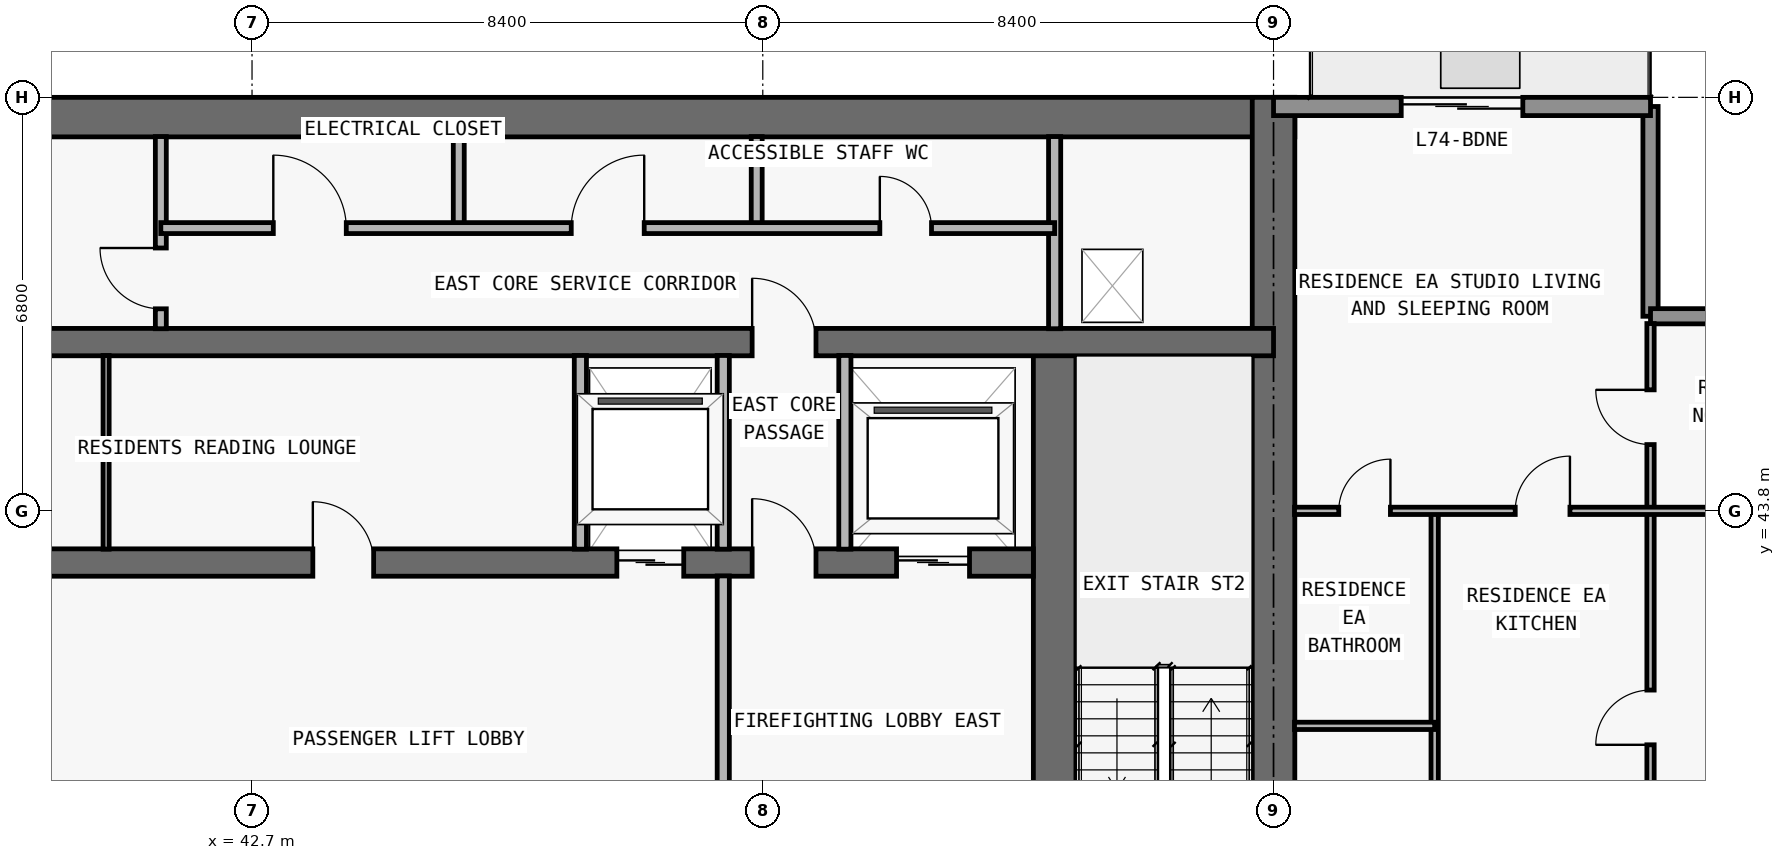
"""IFC4 building model, lengths in metres.
Left out: names, types, materials, properties, quantities, classifications, styles, units other than length and angle.
Written with IfcOpenShell. Run it as: python <this file> out.ifc"""

import sys

from ifc_helpers import new_model, si_unit, direction, frame, frame_2d, origin, place, context, subcontext, project, spatial, rectangle, extrude, element, fill, save


model = new_model("IFC4")
c1 = context("Model", 3, precision=1e-05, world=origin(), true_north=direction((0.0, 1.0)))
c2 = subcontext(c1, "Body", "Model", "MODEL_VIEW")
j1 = project(units=[si_unit("LENGTHUNIT", "METRE"), si_unit("PLANEANGLEUNIT", "RADIAN")], contexts=[c1])
p1 = place(None, origin())
s1 = spatial("IfcSite", under=j1, at=p1, CompositionType="ELEMENT")
p2 = place(p1, origin())
s2 = spatial("IfcBuilding", under=s1, at=p2, CompositionType="ELEMENT")
p3 = place(p2, frame((0.0, 0.0, 262.8)))
s3 = spatial("IfcBuildingStorey", under=s2, at=p3, CompositionType="ELEMENT", Elevation=262.8)
p4 = place(p3, frame((17.95, 50.275, 0.0), z_axis=(0.0, 0.0, 1.0), x_axis=(1.0, 0.0, 0.0)))
e1 = element("IfcWall", 1, at=p4, inside=s3, PredefinedType="SHEAR", context=c2, shape_type="SweptSolid", body=[
    extrude(rectangle(XDim=41.9, YDim=0.65, at=frame_2d((20.95, 0.0))), origin(), (0.0, 0.0, 1.0), 3.05),
])
p5 = place(p3, frame((59.5, 36.65, 0.0), z_axis=(0.0, 0.0, 1.0), x_axis=(0.0, 1.0, 0.0)))
e2 = element("IfcWall", 2, at=p5, inside=s3, PredefinedType="SHEAR", context=c2, shape_type="SweptSolid", body=[
    extrude(rectangle(XDim=13.95, YDim=0.7, at=frame_2d((6.975, 0.0))), origin(), (0.0, 0.0, 1.0), 3.05),
])
p6 = place(p3, frame((55.9, 37.0, 0.0), z_axis=(0.0, 0.0, 1.0), x_axis=(0.0, 1.0, 0.0)))
e3 = element("IfcWall", 3, at=p6, inside=s3, PredefinedType="SHEAR", context=c2, shape_type="SweptSolid", body=[
    extrude(rectangle(XDim=9.575, YDim=0.7, at=frame_2d((4.788, 0.0))), origin(), (0.0, 0.0, 1.0), 3.05),
])
p7 = place(p6, frame((0.55, 0.0, 0.0)))
e4 = element("IfcOpeningElement", 4, at=p7, cuts=e3, PredefinedType="OPENING", context=c2, shape_type="SweptSolid", body=[
    extrude(rectangle(XDim=1.1, YDim=2.15, at=frame_2d((0.55, 1.075))), frame((0.0, 0.36, 0.0), z_axis=(0.0, -1.0, 0.0), x_axis=(1.0, 0.0, 0.0)), (0.0, 0.0, 1.0), 0.72),
])
p8 = place(p3, frame((22.25, 42.95, 0.0), z_axis=(0.0, 0.0, 1.0), x_axis=(1.0, 0.0, 0.0)))
e5 = element("IfcWall", 5, at=p8, inside=s3, PredefinedType="SHEAR", context=c2, shape_type="SweptSolid", body=[
    extrude(rectangle(XDim=33.3, YDim=0.45, at=frame_2d((16.65, 0.0))), origin(), (0.0, 0.0, 1.0), 3.05),
])
p9 = place(p8, frame((1.05, 0.0, 0.0)))
e6 = element("IfcOpeningElement", 6, at=p9, cuts=e5, PredefinedType="OPENING", context=c2, shape_type="SweptSolid", body=[
    extrude(rectangle(XDim=1.2, YDim=2.2, at=frame_2d((0.6, 1.1))), frame((0.0, 0.235, 0.0), z_axis=(0.0, -1.0, 0.0), x_axis=(1.0, 0.0, 0.0)), (0.0, 0.0, 1.0), 0.47),
])
p10 = place(p8, frame((31.05, 0.0, 0.0)))
e7 = element("IfcOpeningElement", 7, at=p10, cuts=e5, PredefinedType="OPENING", context=c2, shape_type="SweptSolid", body=[
    extrude(rectangle(XDim=1.2, YDim=2.2, at=frame_2d((0.6, 1.1))), frame((0.0, 0.235, 0.0), z_axis=(0.0, -1.0, 0.0), x_axis=(1.0, 0.0, 0.0)), (0.0, 0.0, 1.0), 0.47),
])
p11 = place(p8, frame((26.45, 0.0, 0.0)))
e8 = element("IfcOpeningElement", 8, at=p11, cuts=e5, PredefinedType="OPENING", context=c2, shape_type="SweptSolid", body=[
    extrude(rectangle(XDim=1.1, YDim=2.2, at=frame_2d((0.55, 1.1))), frame((0.0, 0.235, 0.0), z_axis=(0.0, -1.0, 0.0), x_axis=(1.0, 0.0, 0.0)), (0.0, 0.0, 1.0), 0.47),
])
p12 = place(p8, frame((5.95, 0.0, 0.0)))
e9 = element("IfcOpeningElement", 9, at=p12, cuts=e5, PredefinedType="OPENING", context=c2, shape_type="SweptSolid", body=[
    extrude(rectangle(XDim=1.1, YDim=2.2, at=frame_2d((0.55, 1.1))), frame((0.0, 0.235, 0.0), z_axis=(0.0, -1.0, 0.0), x_axis=(1.0, 0.0, 0.0)), (0.0, 0.0, 1.0), 0.47),
])
p13 = place(p8, frame((3.625, 0.0, 0.0)))
e10 = element("IfcOpeningElement", 10, at=p13, cuts=e5, PredefinedType="OPENING", context=c2, shape_type="SweptSolid", body=[
    extrude(rectangle(XDim=1.05, YDim=2.15, at=frame_2d((0.525, 1.075))), frame((0.0, 0.235, 0.0), z_axis=(0.0, -1.0, 0.0), x_axis=(1.0, 0.0, 0.0)), (0.0, 0.0, 1.0), 0.47),
])
p14 = place(p8, frame((28.675, 0.0, 0.0)))
e11 = element("IfcOpeningElement", 11, at=p14, cuts=e5, PredefinedType="OPENING", context=c2, shape_type="SweptSolid", body=[
    extrude(rectangle(XDim=1.05, YDim=2.15, at=frame_2d((0.525, 1.075))), frame((0.0, 0.235, 0.0), z_axis=(0.0, -1.0, 0.0), x_axis=(1.0, 0.0, 0.0)), (0.0, 0.0, 1.0), 0.47),
])
p15 = place(p8, frame((14.7, 0.0, 0.0)))
e12 = element("IfcOpeningElement", 12, at=p15, cuts=e5, PredefinedType="OPENING", context=c2, shape_type="SweptSolid", body=[
    extrude(rectangle(XDim=1.0, YDim=2.2, at=frame_2d((0.5, 1.1))), frame((0.0, 0.235, 0.0), z_axis=(0.0, -1.0, 0.0), x_axis=(1.0, 0.0, 0.0)), (0.0, 0.0, 1.0), 0.47),
])
p16 = place(p8, frame((21.45, 0.0, 0.0)))
e13 = element("IfcOpeningElement", 13, at=p16, cuts=e5, PredefinedType="OPENING", context=c2, shape_type="SweptSolid", body=[
    extrude(rectangle(XDim=1.0, YDim=2.2, at=frame_2d((0.5, 1.1))), frame((0.0, 0.235, 0.0), z_axis=(0.0, -1.0, 0.0), x_axis=(1.0, 0.0, 0.0)), (0.0, 0.0, 1.0), 0.47),
])
p17 = place(p3, frame((18.3, 46.575, 0.0), z_axis=(0.0, 0.0, 1.0), x_axis=(1.0, 0.0, 0.0)))
e14 = element("IfcWall", 14, at=p17, inside=s3, PredefinedType="SHEAR", context=c2, shape_type="SweptSolid", body=[
    extrude(rectangle(XDim=41.2, YDim=0.45, at=frame_2d((20.6, 0.0))), origin(), (0.0, 0.0, 1.0), 3.05),
])
p18 = place(p17, frame((7.6, 0.0, 0.0)))
e15 = element("IfcOpeningElement", 15, at=p18, cuts=e14, PredefinedType="OPENING", context=c2, shape_type="SweptSolid", body=[
    extrude(rectangle(XDim=1.0, YDim=2.2, at=frame_2d((0.5, 1.1))), frame((0.0, 0.235, 0.0), z_axis=(0.0, -1.0, 0.0), x_axis=(1.0, 0.0, 0.0)), (0.0, 0.0, 1.0), 0.47),
])
p19 = place(p17, frame((32.625, 0.0, 0.0)))
e16 = element("IfcOpeningElement", 16, at=p19, cuts=e14, PredefinedType="OPENING", context=c2, shape_type="SweptSolid", body=[
    extrude(rectangle(XDim=1.05, YDim=2.15, at=frame_2d((0.525, 1.075))), frame((0.0, 0.235, 0.0), z_axis=(0.0, -1.0, 0.0), x_axis=(1.0, 0.0, 0.0)), (0.0, 0.0, 1.0), 0.47),
])
p20 = place(p3, frame((65.7, 50.45, 0.0), z_axis=(0.0, 0.0, 1.0), x_axis=(0.0, -1.0, 0.0)))
e17 = element("IfcWall", 17, at=p20, inside=s3, PredefinedType="ELEMENTEDWALL", context=c2, shape_type="SweptSolid", body=[
    extrude(rectangle(XDim=3.45, YDim=0.25, at=frame_2d((1.725, 0.0))), origin(), (0.0, 0.0, 1.0), 3.05),
])
p21 = place(p3, frame((65.7, 47.0, 0.0), z_axis=(0.0, 0.0, 1.0), x_axis=(1.0, 0.0, 0.0)))
e18 = element("IfcWall", 18, at=p21, inside=s3, PredefinedType="ELEMENTEDWALL", context=c2, shape_type="SweptSolid", body=[
    extrude(rectangle(XDim=3.85, YDim=0.25, at=frame_2d((1.925, 0.0))), origin(), (0.0, 0.0, 1.0), 3.05),
])
p22 = place(p3, frame((59.5, 50.45, 0.0), z_axis=(0.0, 0.0, 1.0), x_axis=(1.0, 0.0, 0.0)))
e19 = element("IfcWall", 19, at=p22, inside=s3, PredefinedType="STANDARD", context=c2, shape_type="SweptSolid", body=[
    extrude(rectangle(XDim=6.2, YDim=0.3, at=frame_2d((3.1, 0.0))), origin(), (0.0, 0.0, 1.0), 3.05),
])
p23 = place(p22, frame((2.1, 0.0, 0.0)))
e20 = element("IfcOpeningElement", 20, at=p23, cuts=e19, PredefinedType="OPENING", context=c2, shape_type="SweptSolid", body=[
    extrude(rectangle(XDim=2.0, YDim=2.3, at=frame_2d((1.0, 1.15))), frame((0.0, 0.16, 0.0), z_axis=(0.0, -1.0, 0.0), x_axis=(1.0, 0.0, 0.0)), (0.0, 0.0, 1.0), 0.32),
])
p24 = place(p3, frame((40.3, 43.17, 0.0), z_axis=(0.0, 0.0, 1.0), x_axis=(0.0, 1.0, 0.0)))
e21 = element("IfcWall", 21, at=p24, inside=s3, PredefinedType="MOVABLE", context=c2, shape_type="SweptSolid", body=[
    extrude(rectangle(XDim=3.185, YDim=0.1, at=frame_2d((1.593, 0.0))), origin(), (0.0, 0.0, 1.0), 3.05),
])
p25 = place(p3, frame((41.2, 46.795, 0.0), z_axis=(0.0, 0.0, 1.0), x_axis=(0.0, 1.0, 0.0)))
e22 = element("IfcWall", 22, at=p25, inside=s3, PredefinedType="PARTITIONING", context=c2, shape_type="SweptSolid", body=[
    extrude(rectangle(XDim=3.16, YDim=0.18, at=frame_2d((1.58, 0.0))), origin(), (0.0, 0.0, 1.0), 3.05),
])
p26 = place(p25, frame((0.327, 0.0, 0.0)))
e23 = element("IfcOpeningElement", 23, at=p26, cuts=e22, PredefinedType="OPENING", context=c2, shape_type="SweptSolid", body=[
    extrude(rectangle(XDim=1.0, YDim=2.2, at=frame_2d((0.5, 1.1))), frame((0.0, 0.1, 0.0), z_axis=(0.0, -1.0, 0.0), x_axis=(1.0, 0.0, 0.0)), (0.0, 0.0, 1.0), 0.2),
])
p27 = place(p3, frame((46.1, 48.45, 0.0), z_axis=(0.0, 0.0, 1.0), x_axis=(0.0, 1.0, 0.0)))
e24 = element("IfcWall", 24, at=p27, inside=s3, PredefinedType="PARTITIONING", context=c2, shape_type="SweptSolid", body=[
    extrude(rectangle(XDim=1.505, YDim=0.18, at=frame_2d((0.752, 0.0))), origin(), (0.0, 0.0, 1.0), 3.05),
])
p28 = place(p3, frame((48.1, 43.17, 0.0), z_axis=(0.0, 0.0, 1.0), x_axis=(0.0, 1.0, 0.0)))
e25 = element("IfcWall", 25, at=p28, inside=s3, PredefinedType="PARTITIONING", context=c2, shape_type="SweptSolid", body=[
    extrude(rectangle(XDim=3.185, YDim=0.2, at=frame_2d((1.593, 0.0))), origin(), (0.0, 0.0, 1.0), 3.05),
])
p29 = place(p3, frame((50.45, 37.345, 0.0), z_axis=(0.0, 0.0, 1.0), x_axis=(0.0, 1.0, 0.0)))
e26 = element("IfcWall", 26, at=p29, inside=s3, PredefinedType="PARTITIONING", context=c2, shape_type="SweptSolid", body=[
    extrude(rectangle(XDim=5.385, YDim=0.2, at=frame_2d((2.692, 0.0))), origin(), (0.0, 0.0, 1.0), 3.05),
])
p30 = place(p3, frame((50.45, 43.17, 0.0), z_axis=(0.0, 0.0, 1.0), x_axis=(0.0, 1.0, 0.0)))
e27 = element("IfcWall", 27, at=p30, inside=s3, PredefinedType="PARTITIONING", context=c2, shape_type="SweptSolid", body=[
    extrude(rectangle(XDim=3.185, YDim=0.2, at=frame_2d((1.593, 0.0))), origin(), (0.0, 0.0, 1.0), 3.05),
])
p31 = place(p3, frame((51.0, 48.45, 0.0), z_axis=(0.0, 0.0, 1.0), x_axis=(0.0, 1.0, 0.0)))
e28 = element("IfcWall", 28, at=p31, inside=s3, PredefinedType="PARTITIONING", context=c2, shape_type="SweptSolid", body=[
    extrude(rectangle(XDim=1.505, YDim=0.18, at=frame_2d((0.752, 0.0))), origin(), (0.0, 0.0, 1.0), 3.05),
])
p32 = place(p3, frame((52.45, 43.17, 0.0), z_axis=(0.0, 0.0, 1.0), x_axis=(0.0, 1.0, 0.0)))
e29 = element("IfcWall", 29, at=p32, inside=s3, PredefinedType="PARTITIONING", context=c2, shape_type="SweptSolid", body=[
    extrude(rectangle(XDim=3.185, YDim=0.2, at=frame_2d((1.593, 0.0))), origin(), (0.0, 0.0, 1.0), 3.05),
])
p33 = place(p3, frame((55.9, 46.795, 0.0), z_axis=(0.0, 0.0, 1.0), x_axis=(0.0, 1.0, 0.0)))
e30 = element("IfcWall", 30, at=p33, inside=s3, PredefinedType="PARTITIONING", context=c2, shape_type="SweptSolid", body=[
    extrude(rectangle(XDim=3.16, YDim=0.2, at=frame_2d((1.58, 0.0))), origin(), (0.0, 0.0, 1.0), 3.05),
])
p34 = place(p3, frame((62.15, 37.0, 0.0), z_axis=(0.0, 0.0, 1.0), x_axis=(0.0, 1.0, 0.0)))
e31 = element("IfcWall", 31, at=p34, inside=s3, PredefinedType="PARTITIONING", context=c2, shape_type="SweptSolid", body=[
    extrude(rectangle(XDim=6.8, YDim=0.12, at=frame_2d((3.4, 0.0))), origin(), (0.0, 0.0, 1.0), 3.05),
])
p35 = place(p34, frame((1.207, 0.0, 0.0)))
e32 = element("IfcOpeningElement", 32, at=p35, cuts=e31, PredefinedType="OPENING", context=c2, shape_type="SweptSolid", body=[
    extrude(rectangle(XDim=0.85, YDim=2.1, at=frame_2d((0.425, 1.05))), frame((0.0, 0.07, 0.0), z_axis=(0.0, -1.0, 0.0), x_axis=(1.0, 0.0, 0.0)), (0.0, 0.0, 1.0), 0.14),
])
p36 = place(p3, frame((65.7, 37.005, 0.0), z_axis=(0.0, 0.0, 1.0), x_axis=(0.0, 1.0, 0.0)))
e33 = element("IfcWall", 33, at=p36, inside=s3, PredefinedType="PARTITIONING", context=c2, shape_type="SweptSolid", body=[
    extrude(rectangle(XDim=9.875, YDim=0.12, at=frame_2d((4.938, 0.0))), origin(), (0.0, 0.0, 1.0), 2.629),
])
p37 = place(p36, frame((2.948, 0.0, 0.0)))
e34 = element("IfcOpeningElement", 34, at=p37, cuts=e33, PredefinedType="OPENING", context=c2, shape_type="SweptSolid", body=[
    extrude(rectangle(XDim=0.9, YDim=2.15, at=frame_2d((0.45, 1.075))), frame((0.0, 0.07, 0.0), z_axis=(0.0, -1.0, 0.0), x_axis=(1.0, 0.0, 0.0)), (0.0, 0.0, 1.0), 0.14),
])
p38 = place(p36, frame((7.885, 0.0, 0.0)))
e35 = element("IfcOpeningElement", 35, at=p38, cuts=e33, PredefinedType="OPENING", context=c2, shape_type="SweptSolid", body=[
    extrude(rectangle(XDim=0.9, YDim=2.15, at=frame_2d((0.45, 1.075))), frame((0.0, 0.07, 0.0), z_axis=(0.0, -1.0, 0.0), x_axis=(1.0, 0.0, 0.0)), (0.0, 0.0, 1.0), 0.14),
])
p39 = place(p3, frame((59.845, 40.264, 0.0), z_axis=(0.0, 0.0, 1.0), x_axis=(1.0, 0.0, 0.0)))
e36 = element("IfcWall", 36, at=p39, inside=s3, PredefinedType="PARTITIONING", context=c2, shape_type="SweptSolid", body=[
    extrude(rectangle(XDim=2.305, YDim=0.12, at=frame_2d((1.152, 0.0))), origin(), (0.0, 0.0, 1.0), 3.05),
])
p40 = place(p3, frame((59.845, 43.8, 0.0), z_axis=(0.0, 0.0, 1.0), x_axis=(1.0, 0.0, 0.0)))
e37 = element("IfcWall", 37, at=p40, inside=s3, PredefinedType="PARTITIONING", context=c2, shape_type="SweptSolid", body=[
    extrude(rectangle(XDim=9.56, YDim=0.12, at=frame_2d((4.78, 0.0))), origin(), (0.0, 0.0, 1.0), 2.418),
])
p41 = place(p40, frame((3.63, 0.0, 0.0)))
e38 = element("IfcOpeningElement", 38, at=p41, cuts=e37, PredefinedType="OPENING", context=c2, shape_type="SweptSolid", body=[
    extrude(rectangle(XDim=0.9, YDim=2.15, at=frame_2d((0.45, 1.075))), frame((0.0, 0.07, 0.0), z_axis=(0.0, -1.0, 0.0), x_axis=(1.0, 0.0, 0.0)), (0.0, 0.0, 1.0), 0.14),
])
p42 = place(p40, frame((0.728, 0.0, 0.0)))
e39 = element("IfcOpeningElement", 39, at=p42, cuts=e37, PredefinedType="OPENING", context=c2, shape_type="SweptSolid", body=[
    extrude(rectangle(XDim=0.85, YDim=2.1, at=frame_2d((0.425, 1.05))), frame((0.0, 0.07, 0.0), z_axis=(0.0, -1.0, 0.0), x_axis=(1.0, 0.0, 0.0)), (0.0, 0.0, 1.0), 0.14),
])
p43 = place(p3, frame((41.2, 48.45, 0.0), z_axis=(0.0, 0.0, 1.0), x_axis=(1.0, 0.0, 0.0)))
e40 = element("IfcWall", 40, at=p43, inside=s3, PredefinedType="PARTITIONING", context=c2, shape_type="SweptSolid", body=[
    extrude(rectangle(XDim=14.7, YDim=0.18, at=frame_2d((7.35, 0.0))), origin(), (0.0, 0.0, 1.0), 3.05),
])
p44 = place(p43, frame((1.85, 0.0, 0.0)))
e41 = element("IfcOpeningElement", 41, at=p44, cuts=e40, PredefinedType="OPENING", context=c2, shape_type="SweptSolid", body=[
    extrude(rectangle(XDim=1.2, YDim=2.2, at=frame_2d((0.6, 1.1))), frame((0.0, 0.1, 0.0), z_axis=(0.0, -1.0, 0.0), x_axis=(1.0, 0.0, 0.0)), (0.0, 0.0, 1.0), 0.2),
])
p45 = place(p43, frame((6.75, 0.0, 0.0)))
e42 = element("IfcOpeningElement", 42, at=p45, cuts=e40, PredefinedType="OPENING", context=c2, shape_type="SweptSolid", body=[
    extrude(rectangle(XDim=1.2, YDim=2.2, at=frame_2d((0.6, 1.1))), frame((0.0, 0.1, 0.0), z_axis=(0.0, -1.0, 0.0), x_axis=(1.0, 0.0, 0.0)), (0.0, 0.0, 1.0), 0.2),
])
p46 = place(p43, frame((11.825, 0.0, 0.0)))
e43 = element("IfcOpeningElement", 43, at=p46, cuts=e40, PredefinedType="OPENING", context=c2, shape_type="SweptSolid", body=[
    extrude(rectangle(XDim=0.85, YDim=2.1, at=frame_2d((0.425, 1.05))), frame((0.0, 0.1, 0.0), z_axis=(0.0, -1.0, 0.0), x_axis=(1.0, 0.0, 0.0)), (0.0, 0.0, 1.0), 0.2),
])
p47 = place(p23, origin())
e44 = element("IfcDoor", 44, at=p47, inside=s3, OperationType="DOUBLE_DOOR_SLIDING", PredefinedType="DOOR", context=c2, shape_type="SweptSolid", body=[
    extrude(rectangle(XDim=2.0, YDim=2.3, at=frame_2d((1.0, 1.15))), frame((0.0, 0.025, 0.0), z_axis=(0.0, -1.0, 0.0), x_axis=(1.0, 0.0, 0.0)), (0.0, 0.0, 1.0), 0.05),
])
fill(e20, e44)
p48 = place(p10, origin())
e45 = element("IfcDoor", 45, at=p48, inside=s3, OperationType="DOUBLE_DOOR_SLIDING", PredefinedType="DOOR", context=c2, shape_type="SweptSolid", body=[
    extrude(rectangle(XDim=1.2, YDim=2.2, at=frame_2d((0.6, 1.1))), frame((0.0, 0.025, 0.0), z_axis=(0.0, -1.0, 0.0), x_axis=(1.0, 0.0, 0.0)), (0.0, 0.0, 1.0), 0.05),
])
fill(e7, e45)
p49 = place(p11, origin())
e46 = element("IfcDoor", 46, at=p49, inside=s3, OperationType="DOUBLE_DOOR_SLIDING", PredefinedType="DOOR", context=c2, shape_type="SweptSolid", body=[
    extrude(rectangle(XDim=1.1, YDim=2.2, at=frame_2d((0.55, 1.1))), frame((0.0, 0.025, 0.0), z_axis=(0.0, -1.0, 0.0), x_axis=(1.0, 0.0, 0.0)), (0.0, 0.0, 1.0), 0.05),
])
fill(e8, e46)
p50 = place(p14, origin())
e47 = element("IfcDoor", 47, at=p50, inside=s3, OperationType="SINGLE_SWING_LEFT", PredefinedType="DOOR", context=c2, shape_type="SweptSolid", body=[
    extrude(rectangle(XDim=1.05, YDim=2.15, at=frame_2d((0.525, 1.075))), frame((0.0, 0.025, 0.0), z_axis=(0.0, -1.0, 0.0), x_axis=(1.0, 0.0, 0.0)), (0.0, 0.0, 1.0), 0.05),
])
fill(e11, e47)
p51 = place(p16, origin())
e48 = element("IfcDoor", 48, at=p51, inside=s3, OperationType="SINGLE_SWING_LEFT", PredefinedType="DOOR", context=c2, shape_type="SweptSolid", body=[
    extrude(rectangle(XDim=1.0, YDim=2.2, at=frame_2d((0.5, 1.1))), frame((0.0, 0.025, 0.0), z_axis=(0.0, -1.0, 0.0), x_axis=(1.0, 0.0, 0.0)), (0.0, 0.0, 1.0), 0.05),
])
fill(e13, e48)
p52 = place(p19, origin())
e49 = element("IfcDoor", 49, at=p52, inside=s3, OperationType="SINGLE_SWING_LEFT", PredefinedType="DOOR", context=c2, shape_type="SweptSolid", body=[
    extrude(rectangle(XDim=1.05, YDim=2.15, at=frame_2d((0.525, 1.075))), frame((0.0, 0.025, 0.0), z_axis=(0.0, -1.0, 0.0), x_axis=(1.0, 0.0, 0.0)), (0.0, 0.0, 1.0), 0.05),
])
fill(e16, e49)
p53 = place(p26, origin())
e50 = element("IfcDoor", 50, at=p53, inside=s3, OperationType="SINGLE_SWING_RIGHT", PredefinedType="DOOR", context=c2, shape_type="SweptSolid", body=[
    extrude(rectangle(XDim=1.0, YDim=2.2, at=frame_2d((0.5, 1.1))), frame((0.0, 0.025, 0.0), z_axis=(0.0, -1.0, 0.0), x_axis=(1.0, 0.0, 0.0)), (0.0, 0.0, 1.0), 0.05),
])
fill(e23, e50)
p54 = place(p44, origin())
e51 = element("IfcDoor", 51, at=p54, inside=s3, OperationType="SINGLE_SWING_LEFT", PredefinedType="DOOR", context=c2, shape_type="SweptSolid", body=[
    extrude(rectangle(XDim=1.2, YDim=2.2, at=frame_2d((0.6, 1.1))), frame((0.0, 0.025, 0.0), z_axis=(0.0, -1.0, 0.0), x_axis=(1.0, 0.0, 0.0)), (0.0, 0.0, 1.0), 0.05),
])
fill(e41, e51)
p55 = place(p45, origin())
e52 = element("IfcDoor", 52, at=p55, inside=s3, OperationType="SINGLE_SWING_RIGHT", PredefinedType="DOOR", context=c2, shape_type="SweptSolid", body=[
    extrude(rectangle(XDim=1.2, YDim=2.2, at=frame_2d((0.6, 1.1))), frame((0.0, 0.025, 0.0), z_axis=(0.0, -1.0, 0.0), x_axis=(1.0, 0.0, 0.0)), (0.0, 0.0, 1.0), 0.05),
])
fill(e42, e52)
p56 = place(p46, origin())
e53 = element("IfcDoor", 53, at=p56, inside=s3, OperationType="SINGLE_SWING_LEFT", PredefinedType="DOOR", context=c2, shape_type="SweptSolid", body=[
    extrude(rectangle(XDim=0.85, YDim=2.1, at=frame_2d((0.425, 1.05))), frame((0.0, 0.025, 0.0), z_axis=(0.0, -1.0, 0.0), x_axis=(1.0, 0.0, 0.0)), (0.0, 0.0, 1.0), 0.05),
])
fill(e43, e53)
p57 = place(p41, origin())
e54 = element("IfcDoor", 54, at=p57, inside=s3, OperationType="SINGLE_SWING_RIGHT", PredefinedType="DOOR", context=c2, shape_type="SweptSolid", body=[
    extrude(rectangle(XDim=0.9, YDim=2.15, at=frame_2d((0.45, 1.075))), frame((0.0, 0.025, 0.0), z_axis=(0.0, -1.0, 0.0), x_axis=(1.0, 0.0, 0.0)), (0.0, 0.0, 1.0), 0.05),
])
fill(e38, e54)
p58 = place(p42, origin())
e55 = element("IfcDoor", 55, at=p58, inside=s3, OperationType="SINGLE_SWING_RIGHT", PredefinedType="DOOR", context=c2, shape_type="SweptSolid", body=[
    extrude(rectangle(XDim=0.85, YDim=2.1, at=frame_2d((0.425, 1.05))), frame((0.0, 0.025, 0.0), z_axis=(0.0, -1.0, 0.0), x_axis=(1.0, 0.0, 0.0)), (0.0, 0.0, 1.0), 0.05),
])
fill(e39, e55)
p59 = place(p37, origin())
e56 = element("IfcDoor", 56, at=p59, inside=s3, OperationType="SINGLE_SWING_LEFT", PredefinedType="DOOR", context=c2, shape_type="SweptSolid", body=[
    extrude(rectangle(XDim=0.9, YDim=2.15, at=frame_2d((0.45, 1.075))), frame((0.0, 0.025, 0.0), z_axis=(0.0, -1.0, 0.0), x_axis=(1.0, 0.0, 0.0)), (0.0, 0.0, 1.0), 0.05),
])
fill(e34, e56)
p60 = place(p38, origin())
e57 = element("IfcDoor", 57, at=p60, inside=s3, OperationType="SINGLE_SWING_RIGHT", PredefinedType="DOOR", context=c2, shape_type="SweptSolid", body=[
    extrude(rectangle(XDim=0.9, YDim=2.15, at=frame_2d((0.45, 1.075))), frame((0.0, 0.025, 0.0), z_axis=(0.0, -1.0, 0.0), x_axis=(1.0, 0.0, 0.0)), (0.0, 0.0, 1.0), 0.05),
])
fill(e35, e57)
save(model, sys.argv[1])
